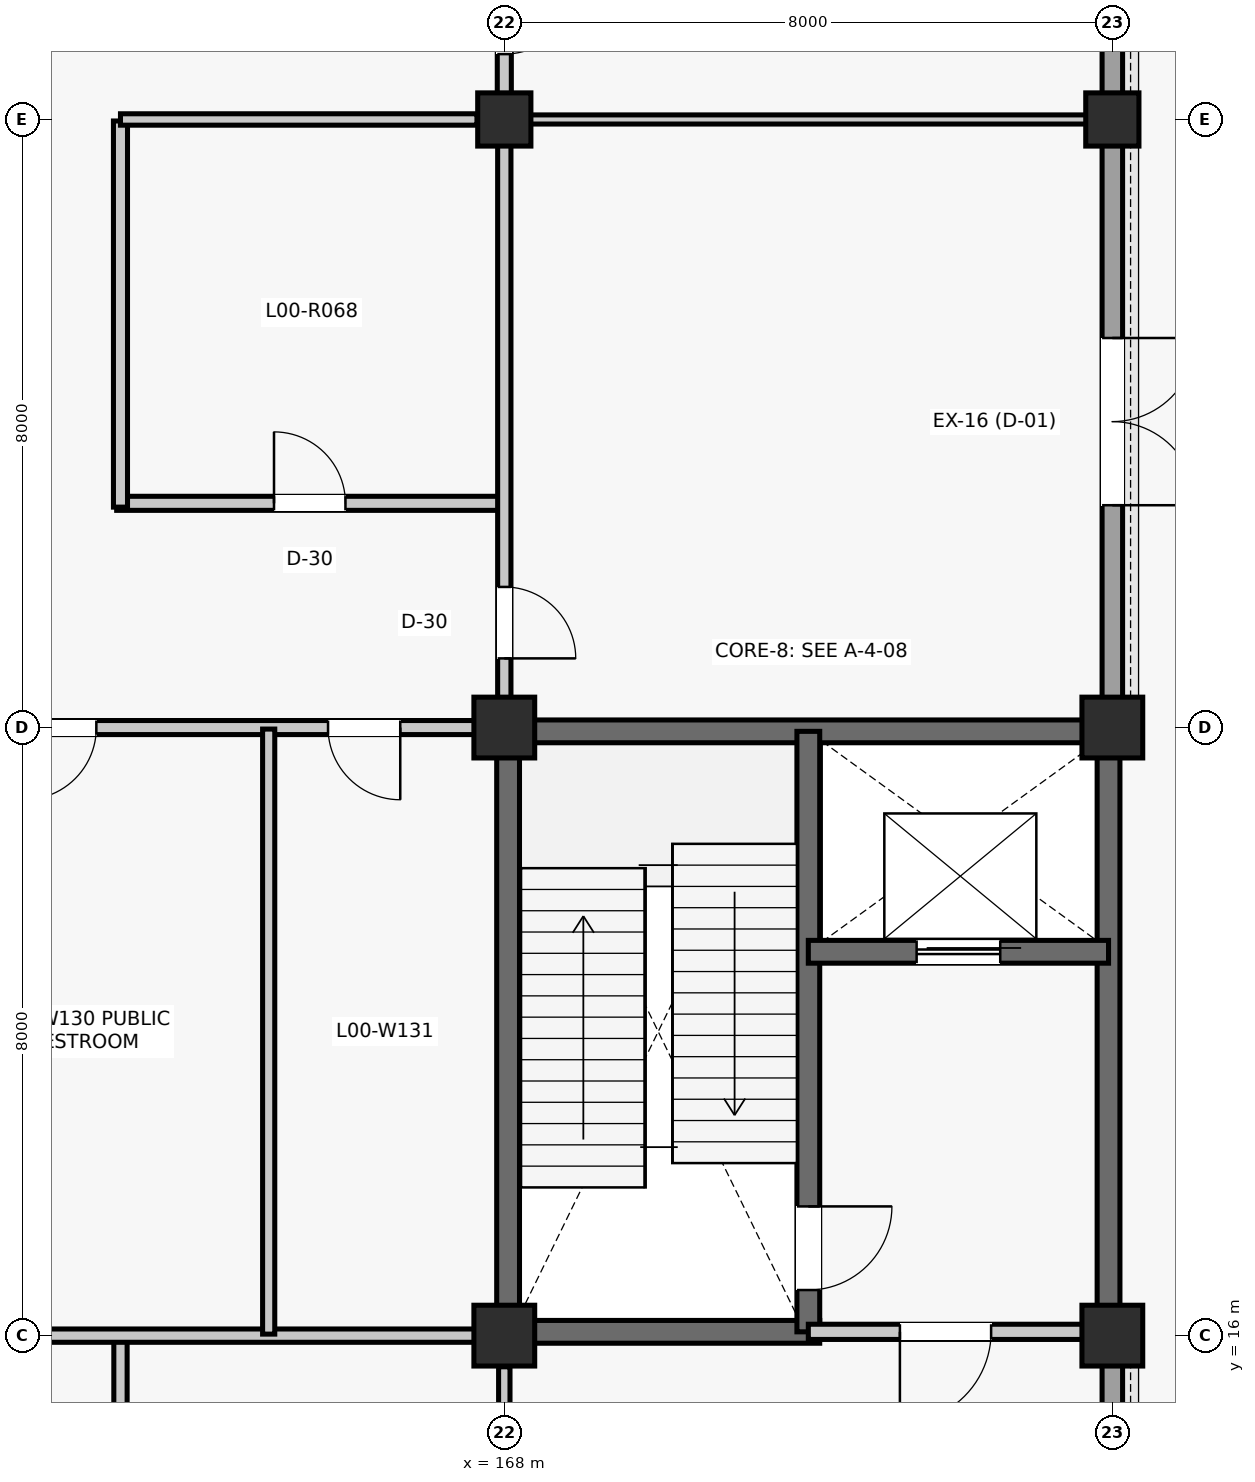
"""IFC4 building model, lengths in metres.
Left out: names, types, materials, properties, quantities, classifications, styles, units other than length and angle.
Written with IfcOpenShell. Run it as: python <this file> out.ifc"""

import sys

from ifc_helpers import new_model, si_unit, direction, frame, frame_2d, origin, origin_2d, place, context, subcontext, project, spatial, rectangle, extrude, element, fill, save


model = new_model("IFC4")
c1 = context("Model", 3, precision=1e-05, world=origin(), true_north=direction((0.0, 1.0)))
c2 = subcontext(c1, "Body", "Model", "MODEL_VIEW")
j1 = project(units=[si_unit("LENGTHUNIT", "METRE"), si_unit("PLANEANGLEUNIT", "RADIAN")], contexts=[c1])
p1 = place(None, origin())
s1 = spatial("IfcSite", under=j1, at=p1, CompositionType="ELEMENT")
p2 = place(p1, origin())
s2 = spatial("IfcBuilding", under=s1, at=p2, CompositionType="ELEMENT")
p3 = place(p2, origin())
s3 = spatial("IfcBuildingStorey", under=s2, at=p3, CompositionType="ELEMENT", Elevation=0.0)
for number, where, z_axis, x_axis in (
    (1, (168.0, 16.0, 0.0), (0.0, 0.0, 1.0), (1.0, 0.0, 0.0)),
    (2, (168.0, 24.0, 0.0), (0.0, 0.0, 1.0), (1.0, 0.0, 0.0)),
):
    element("IfcColumn", number, at=place(p3, frame(where, z_axis=z_axis, x_axis=x_axis)), inside=s3, PredefinedType="COLUMN", context=c2, shape_type="SweptSolid", body=[
        extrude(rectangle(XDim=0.8, YDim=0.8, at=origin_2d()), origin(), (0.0, 0.0, 1.0), 5.28),
    ])
p4 = place(p3, frame((168.0, 32.0, 0.0), z_axis=(0.0, 0.0, 1.0), x_axis=(1.0, 0.0, 0.0)))
e3 = element("IfcColumn", 3, at=p4, inside=s3, PredefinedType="COLUMN", context=c2, shape_type="SweptSolid", body=[
    extrude(rectangle(XDim=0.7, YDim=0.7, at=origin_2d()), origin(), (0.0, 0.0, 1.0), 5.28),
])
for number, where, z_axis, x_axis in (
    (4, (176.0, 16.0, 0.0), (0.0, 0.0, 1.0), (1.0, 0.0, 0.0)),
    (5, (176.0, 24.0, 0.0), (0.0, 0.0, 1.0), (1.0, 0.0, 0.0)),
):
    element("IfcColumn", number, at=place(p3, frame(where, z_axis=z_axis, x_axis=x_axis)), inside=s3, PredefinedType="COLUMN", context=c2, shape_type="SweptSolid", body=[
        extrude(rectangle(XDim=0.8, YDim=0.8, at=origin_2d()), origin(), (0.0, 0.0, 1.0), 5.28),
    ])
p5 = place(p3, frame((176.0, 32.0, 0.0), z_axis=(0.0, 0.0, 1.0), x_axis=(1.0, 0.0, 0.0)))
e6 = element("IfcColumn", 6, at=p5, inside=s3, PredefinedType="COLUMN", context=c2, shape_type="SweptSolid", body=[
    extrude(rectangle(XDim=0.7, YDim=0.7, at=origin_2d()), origin(), (0.0, 0.0, 1.0), 5.28),
])
p6 = place(p3, frame((176.0, 8.335, 0.0), z_axis=(0.0, 0.0, 1.0), x_axis=(0.0, 1.0, 0.0)))
e7 = element("IfcWall", 7, at=p6, inside=s3, PredefinedType="SOLIDWALL", context=c2, shape_type="SweptSolid", body=[
    extrude(rectangle(XDim=7.28, YDim=0.27, at=frame_2d((3.64, 0.0))), origin(), (0.0, 0.0, 1.0), 4.677),
])
p7 = place(p6, frame((4.25, 0.0, 0.9)))
e8 = element("IfcOpeningElement", 8, at=p7, cuts=e7, PredefinedType="OPENING", context=c2, shape_type="SweptSolid", body=[
    extrude(rectangle(XDim=1.85, YDim=2.65, at=frame_2d((0.925, 1.325))), frame((0.0, 0.145, 0.0), z_axis=(0.0, -1.0, 0.0), x_axis=(1.0, 0.0, 0.0)), (0.0, 0.0, 1.0), 0.29),
])
p8 = place(p3, frame((176.0, 24.385, 0.0), z_axis=(0.0, 0.0, 1.0), x_axis=(0.0, 1.0, 0.0)))
e9 = element("IfcWall", 9, at=p8, inside=s3, PredefinedType="SOLIDWALL", context=c2, shape_type="SweptSolid", body=[
    extrude(rectangle(XDim=7.28, YDim=0.27, at=frame_2d((3.64, 0.0))), origin(), (0.0, 0.0, 1.0), 4.674),
])
p9 = place(p8, frame((2.54, 0.0, 0.0)))
e10 = element("IfcOpeningElement", 10, at=p9, cuts=e9, PredefinedType="OPENING", context=c2, shape_type="SweptSolid", body=[
    extrude(rectangle(XDim=2.2, YDim=2.5, at=frame_2d((1.1, 1.25))), frame((0.0, 0.145, 0.0), z_axis=(0.0, -1.0, 0.0), x_axis=(1.0, 0.0, 0.0)), (0.0, 0.0, 1.0), 0.29),
])
p10 = place(p3, frame((176.0, 32.335, 0.0), z_axis=(0.0, 0.0, 1.0), x_axis=(0.0, 1.0, 0.0)))
e11 = element("IfcWall", 11, at=p10, inside=s3, PredefinedType="SOLIDWALL", context=c2, shape_type="SweptSolid", body=[
    extrude(rectangle(XDim=7.33, YDim=0.27, at=frame_2d((3.665, 0.0))), origin(), (0.0, 0.0, 1.0), 4.614),
])
p11 = place(p10, frame((4.25, 0.0, 0.9)))
e12 = element("IfcOpeningElement", 12, at=p11, cuts=e11, PredefinedType="OPENING", context=c2, shape_type="SweptSolid", body=[
    extrude(rectangle(XDim=2.15, YDim=2.8, at=frame_2d((1.075, 1.4))), frame((0.0, 0.145, 0.0), z_axis=(0.0, -1.0, 0.0), x_axis=(1.0, 0.0, 0.0)), (0.0, 0.0, 1.0), 0.29),
])
for number, where, z_axis, x_axis in (
    (13, (168.05, 16.29, 0.0), (0.0, 0.0, 1.0), (0.0, 1.0, 0.0)),
    (14, (168.29, 23.95, 0.0), (0.0, 0.0, 1.0), (1.0, 0.0, 0.0)),
    (15, (175.95, 16.29, 0.0), (0.0, 0.0, 1.0), (0.0, 1.0, 0.0)),
):
    element("IfcWall", number, at=place(p3, frame(where, z_axis=z_axis, x_axis=x_axis)), inside=s3, PredefinedType="SHEAR", context=c2, shape_type="SweptSolid", body=[
        extrude(rectangle(XDim=7.42, YDim=0.3, at=frame_2d((3.71, 0.0))), origin(), (0.0, 0.0, 1.0), 5.035),
    ])
p12 = place(p3, frame((168.29, 16.05, 0.0), z_axis=(0.0, 0.0, 1.0), x_axis=(1.0, 0.0, 0.0)))
e16 = element("IfcWall", 16, at=p12, inside=s3, PredefinedType="SHEAR", context=c2, shape_type="SweptSolid", body=[
    extrude(rectangle(XDim=3.86, YDim=0.3, at=frame_2d((1.93, 0.0))), origin(), (0.0, 0.0, 1.0), 5.035),
])
p13 = place(p3, frame((172.0, 16.05, 0.0), z_axis=(0.0, 0.0, 1.0), x_axis=(0.0, 1.0, 0.0)))
e17 = element("IfcWall", 17, at=p13, inside=s3, PredefinedType="SHEAR", context=c2, shape_type="SweptSolid", body=[
    extrude(rectangle(XDim=7.9, YDim=0.3, at=frame_2d((3.95, 0.0))), origin(), (0.0, 0.0, 1.0), 5.035),
])
p14 = place(p13, frame((0.55, 0.0, 0.0)))
e18 = element("IfcOpeningElement", 18, at=p14, cuts=e17, PredefinedType="OPENING", context=c2, shape_type="SweptSolid", body=[
    extrude(rectangle(XDim=1.1, YDim=2.15, at=frame_2d((0.55, 1.075))), frame((0.0, 0.16, 0.0), z_axis=(0.0, -1.0, 0.0), x_axis=(1.0, 0.0, 0.0)), (0.0, 0.0, 1.0), 0.32),
])
p15 = place(p3, frame((172.0, 21.05, 0.0), z_axis=(0.0, 0.0, 1.0), x_axis=(1.0, 0.0, 0.0)))
e19 = element("IfcWall", 19, at=p15, inside=s3, PredefinedType="SHEAR", context=c2, shape_type="SweptSolid", body=[
    extrude(rectangle(XDim=3.95, YDim=0.3, at=frame_2d((1.975, 0.0))), origin(), (0.0, 0.0, 1.0), 5.035),
])
p16 = place(p15, frame((1.425, 0.0, 0.0)))
e20 = element("IfcOpeningElement", 20, at=p16, cuts=e19, PredefinedType="OPENING", context=c2, shape_type="SweptSolid", body=[
    extrude(rectangle(XDim=1.1, YDim=2.2, at=frame_2d((0.55, 1.1))), frame((0.0, 0.16, 0.0), z_axis=(0.0, -1.0, 0.0), x_axis=(1.0, 0.0, 0.0)), (0.0, 0.0, 1.0), 0.32),
])
p17 = place(p3, frame((172.0, 16.05, 0.0), z_axis=(0.0, 0.0, 1.0), x_axis=(1.0, 0.0, 0.0)))
e21 = element("IfcWall", 21, at=p17, inside=s3, PredefinedType="PARTITIONING", context=c2, shape_type="SweptSolid", body=[
    extrude(rectangle(XDim=3.61, YDim=0.2, at=frame_2d((1.805, 0.0))), origin(), (0.0, 0.0, 1.0), 4.404),
])
p18 = place(p17, frame((1.205, 0.0, 0.0)))
e22 = element("IfcOpeningElement", 22, at=p18, cuts=e21, PredefinedType="OPENING", context=c2, shape_type="SweptSolid", body=[
    extrude(rectangle(XDim=1.2, YDim=2.15, at=frame_2d((0.6, 1.075))), frame((0.0, 0.11, 0.0), z_axis=(0.0, -1.0, 0.0), x_axis=(1.0, 0.0, 0.0)), (0.0, 0.0, 1.0), 0.22),
])
p19 = place(p3, frame((162.95, 10.9, 0.0), z_axis=(0.0, 0.0, 1.0), x_axis=(0.0, 1.0, 0.0)))
e23 = element("IfcWall", 23, at=p19, inside=s3, PredefinedType="PARTITIONING", context=c2, shape_type="SweptSolid", body=[
    extrude(rectangle(XDim=5.08, YDim=0.175, at=frame_2d((2.54, 0.0))), origin(), (0.0, 0.0, 1.0), 4.336),
])
p20 = place(p3, frame((168.0, 10.95, 0.0), z_axis=(0.0, 0.0, 1.0), x_axis=(0.0, 1.0, 0.0)))
e24 = element("IfcWall", 24, at=p20, inside=s3, PredefinedType="PARTITIONING", context=c2, shape_type="SweptSolid", body=[
    extrude(rectangle(XDim=4.64, YDim=0.15, at=frame_2d((2.32, 0.0))), origin(), (0.0, 0.0, 1.0), 4.404),
])
p21 = place(p3, frame((162.9, 26.95, 0.0), z_axis=(0.0, 0.0, 1.0), x_axis=(1.0, 0.0, 0.0)))
e25 = element("IfcWall", 25, at=p21, inside=s3, PredefinedType="PARTITIONING", context=c2, shape_type="SweptSolid", body=[
    extrude(rectangle(XDim=5.08, YDim=0.185, at=frame_2d((2.54, 0.0))), origin(), (0.0, 0.0, 1.0), 4.403),
])
p22 = place(p21, frame((2.07, 0.0, 0.0)))
e26 = element("IfcOpeningElement", 26, at=p22, cuts=e25, PredefinedType="OPENING", context=c2, shape_type="SweptSolid", body=[
    extrude(rectangle(XDim=0.94, YDim=2.12, at=frame_2d((0.47, 1.06))), frame((0.0, 0.103, 0.0), z_axis=(0.0, -1.0, 0.0), x_axis=(1.0, 0.0, 0.0)), (0.0, 0.0, 1.0), 0.205),
])
p23 = place(p3, frame((162.95, 26.9, 0.0), z_axis=(0.0, 0.0, 1.0), x_axis=(0.0, 1.0, 0.0)))
e27 = element("IfcWall", 27, at=p23, inside=s3, PredefinedType="PARTITIONING", context=c2, shape_type="SweptSolid", body=[
    extrude(rectangle(XDim=5.08, YDim=0.185, at=frame_2d((2.54, 0.0))), origin(), (0.0, 0.0, 1.0), 4.327),
])
p24 = place(p3, frame((162.95, 32.0, 0.0), z_axis=(0.0, 0.0, 1.0), x_axis=(1.0, 0.0, 0.0)))
e28 = element("IfcWall", 28, at=p24, inside=s3, PredefinedType="PARTITIONING", context=c2, shape_type="SweptSolid", body=[
    extrude(rectangle(XDim=4.69, YDim=0.15, at=frame_2d((2.345, 0.0))), origin(), (0.0, 0.0, 1.0), 4.327),
])
p25 = place(p3, frame((160.34, 16.0, 0.0), z_axis=(0.0, 0.0, 1.0), x_axis=(1.0, 0.0, 0.0)))
e29 = element("IfcWall", 29, at=p25, inside=s3, PredefinedType="PARTITIONING", context=c2, shape_type="SweptSolid", body=[
    extrude(rectangle(XDim=7.27, YDim=0.175, at=frame_2d((3.635, 0.0))), origin(), (0.0, 0.0, 1.0), 4.336),
])
p26 = place(p25, frame((0.52, 0.0, 0.0)))
e30 = element("IfcOpeningElement", 30, at=p26, cuts=e29, PredefinedType="OPENING", context=c2, shape_type="SweptSolid", body=[
    extrude(rectangle(XDim=0.94, YDim=2.12, at=frame_2d((0.47, 1.06))), frame((0.0, 0.097, 0.0), z_axis=(0.0, -1.0, 0.0), x_axis=(1.0, 0.0, 0.0)), (0.0, 0.0, 1.0), 0.195),
])
p27 = place(p3, frame((160.34, 24.0, 0.0), z_axis=(0.0, 0.0, 1.0), x_axis=(1.0, 0.0, 0.0)))
e31 = element("IfcWall", 31, at=p27, inside=s3, PredefinedType="PARTITIONING", context=c2, shape_type="SweptSolid", body=[
    extrude(rectangle(XDim=7.27, YDim=0.185, at=frame_2d((3.635, 0.0))), origin(), (0.0, 0.0, 1.0), 4.404),
])
p28 = place(p27, frame((1.343, 0.0, 0.0)))
e32 = element("IfcOpeningElement", 32, at=p28, cuts=e31, PredefinedType="OPENING", context=c2, shape_type="SweptSolid", body=[
    extrude(rectangle(XDim=0.95, YDim=2.1, at=frame_2d((0.475, 1.05))), frame((0.0, 0.103, 0.0), z_axis=(0.0, -1.0, 0.0), x_axis=(1.0, 0.0, 0.0)), (0.0, 0.0, 1.0), 0.205),
])
p29 = place(p27, frame((5.341, 0.0, 0.0)))
e33 = element("IfcOpeningElement", 33, at=p29, cuts=e31, PredefinedType="OPENING", context=c2, shape_type="SweptSolid", body=[
    extrude(rectangle(XDim=0.95, YDim=2.1, at=frame_2d((0.475, 1.05))), frame((0.0, 0.103, 0.0), z_axis=(0.0, -1.0, 0.0), x_axis=(1.0, 0.0, 0.0)), (0.0, 0.0, 1.0), 0.205),
])
p30 = place(p3, frame((168.0, 24.39, 0.0), z_axis=(0.0, 0.0, 1.0), x_axis=(0.0, 1.0, 0.0)))
e34 = element("IfcWall", 34, at=p30, inside=s3, PredefinedType="PARTITIONING", context=c2, shape_type="SweptSolid", body=[
    extrude(rectangle(XDim=7.27, YDim=0.175, at=frame_2d((3.635, 0.0))), origin(), (0.0, 0.0, 1.0), 4.403),
])
p31 = place(p30, frame((0.52, 0.0, 0.0)))
e35 = element("IfcOpeningElement", 35, at=p31, cuts=e34, PredefinedType="OPENING", context=c2, shape_type="SweptSolid", body=[
    extrude(rectangle(XDim=0.94, YDim=2.12, at=frame_2d((0.47, 1.06))), frame((0.0, 0.097, 0.0), z_axis=(0.0, -1.0, 0.0), x_axis=(1.0, 0.0, 0.0)), (0.0, 0.0, 1.0), 0.195),
])
p32 = place(p3, frame((168.0, 32.34, 0.0), z_axis=(0.0, 0.0, 1.0), x_axis=(0.0, 1.0, 0.0)))
e36 = element("IfcWall", 36, at=p32, inside=s3, PredefinedType="PARTITIONING", context=c2, shape_type="SweptSolid", body=[
    extrude(rectangle(XDim=7.32, YDim=0.185, at=frame_2d((3.66, 0.0))), origin(), (0.0, 0.0, 1.0), 4.412),
])
p33 = place(p32, frame((0.52, 0.0, 0.0)))
e37 = element("IfcOpeningElement", 37, at=p33, cuts=e36, PredefinedType="OPENING", context=c2, shape_type="SweptSolid", body=[
    extrude(rectangle(XDim=0.94, YDim=2.12, at=frame_2d((0.47, 1.06))), frame((0.0, 0.103, 0.0), z_axis=(0.0, -1.0, 0.0), x_axis=(1.0, 0.0, 0.0)), (0.0, 0.0, 1.0), 0.205),
])
p34 = place(p3, frame((168.34, 32.0, 0.0), z_axis=(0.0, 0.0, 1.0), x_axis=(1.0, 0.0, 0.0)))
e38 = element("IfcWall", 38, at=p34, inside=s3, PredefinedType="PARTITIONING", context=c2, shape_type="SweptSolid", body=[
    extrude(rectangle(XDim=7.32, YDim=0.12, at=frame_2d((3.66, 0.0))), origin(), (0.0, 0.0, 1.0), 4.403),
])
p35 = place(p3, frame((164.9, 16.02, 0.0), z_axis=(0.0, 0.0, 1.0), x_axis=(0.0, 1.0, 0.0)))
e39 = element("IfcWall", 39, at=p35, inside=s3, PredefinedType="PARTITIONING", context=c2, shape_type="SweptSolid", body=[
    extrude(rectangle(XDim=7.96, YDim=0.16, at=frame_2d((3.98, 0.0))), origin(), (0.0, 0.0, 1.0), 4.336),
])
p36 = place(p9, frame((2.2, 0.0, 0.0), z_axis=(0.0, 0.0, 1.0), x_axis=(-1.0, 0.0, 0.0)))
e40 = element("IfcDoor", 40, at=p36, inside=s3, OperationType="DOUBLE_DOOR_SINGLE_SWING", PredefinedType="DOOR", context=c2, shape_type="SweptSolid", body=[
    extrude(rectangle(XDim=2.2, YDim=2.5, at=frame_2d((1.1, 1.25))), frame((0.0, 0.025, 0.0), z_axis=(0.0, -1.0, 0.0), x_axis=(1.0, 0.0, 0.0)), (0.0, 0.0, 1.0), 0.05),
])
fill(e10, e40)
p37 = place(p14, frame((1.1, 0.0, 0.0), z_axis=(0.0, 0.0, 1.0), x_axis=(-1.0, 0.0, 0.0)))
e41 = element("IfcDoor", 41, at=p37, inside=s3, OperationType="SINGLE_SWING_RIGHT", PredefinedType="DOOR", context=c2, shape_type="SweptSolid", body=[
    extrude(rectangle(XDim=1.1, YDim=2.15, at=frame_2d((0.55, 1.075))), frame((0.0, 0.025, 0.0), z_axis=(0.0, -1.0, 0.0), x_axis=(1.0, 0.0, 0.0)), (0.0, 0.0, 1.0), 0.05),
])
fill(e18, e41)
p38 = place(p16, origin())
e42 = element("IfcDoor", 42, at=p38, inside=s3, OperationType="SLIDING_TO_LEFT", PredefinedType="DOOR", context=c2, shape_type="SweptSolid", body=[
    extrude(rectangle(XDim=1.1, YDim=2.2, at=frame_2d((0.55, 1.1))), frame((0.0, 0.025, 0.0), z_axis=(0.0, -1.0, 0.0), x_axis=(1.0, 0.0, 0.0)), (0.0, 0.0, 1.0), 0.05),
])
fill(e20, e42)
p39 = place(p18, frame((1.2, 0.0, 0.0), z_axis=(0.0, 0.0, 1.0), x_axis=(-1.0, 0.0, 0.0)))
e43 = element("IfcDoor", 43, at=p39, inside=s3, OperationType="SINGLE_SWING_LEFT", PredefinedType="DOOR", context=c2, shape_type="SweptSolid", body=[
    extrude(rectangle(XDim=1.2, YDim=2.15, at=frame_2d((0.6, 1.075))), frame((0.0, 0.025, 0.0), z_axis=(0.0, -1.0, 0.0), x_axis=(1.0, 0.0, 0.0)), (0.0, 0.0, 1.0), 0.05),
])
fill(e22, e43)
p40 = place(p22, origin())
e44 = element("IfcDoor", 44, at=p40, inside=s3, OperationType="SINGLE_SWING_LEFT", PredefinedType="DOOR", context=c2, shape_type="SweptSolid", body=[
    extrude(rectangle(XDim=0.94, YDim=2.12, at=frame_2d((0.47, 1.06))), frame((0.0, 0.025, 0.0), z_axis=(0.0, -1.0, 0.0), x_axis=(1.0, 0.0, 0.0)), (0.0, 0.0, 1.0), 0.05),
])
fill(e26, e44)
p41 = place(p28, frame((0.95, 0.0, 0.0), z_axis=(0.0, 0.0, 1.0), x_axis=(-1.0, 0.0, 0.0)))
e45 = element("IfcDoor", 45, at=p41, inside=s3, OperationType="SINGLE_SWING_LEFT", PredefinedType="DOOR", context=c2, shape_type="SweptSolid", body=[
    extrude(rectangle(XDim=0.95, YDim=2.1, at=frame_2d((0.475, 1.05))), frame((0.0, 0.025, 0.0), z_axis=(0.0, -1.0, 0.0), x_axis=(1.0, 0.0, 0.0)), (0.0, 0.0, 1.0), 0.05),
])
fill(e32, e45)
p42 = place(p29, frame((0.95, 0.0, 0.0), z_axis=(0.0, 0.0, 1.0), x_axis=(-1.0, 0.0, 0.0)))
e46 = element("IfcDoor", 46, at=p42, inside=s3, OperationType="SINGLE_SWING_RIGHT", PredefinedType="DOOR", context=c2, shape_type="SweptSolid", body=[
    extrude(rectangle(XDim=0.95, YDim=2.1, at=frame_2d((0.475, 1.05))), frame((0.0, 0.025, 0.0), z_axis=(0.0, -1.0, 0.0), x_axis=(1.0, 0.0, 0.0)), (0.0, 0.0, 1.0), 0.05),
])
fill(e33, e46)
p43 = place(p31, frame((0.94, 0.0, 0.0), z_axis=(0.0, 0.0, 1.0), x_axis=(-1.0, 0.0, 0.0)))
e47 = element("IfcDoor", 47, at=p43, inside=s3, OperationType="SINGLE_SWING_LEFT", PredefinedType="DOOR", context=c2, shape_type="SweptSolid", body=[
    extrude(rectangle(XDim=0.94, YDim=2.12, at=frame_2d((0.47, 1.06))), frame((0.0, 0.025, 0.0), z_axis=(0.0, -1.0, 0.0), x_axis=(1.0, 0.0, 0.0)), (0.0, 0.0, 1.0), 0.05),
])
fill(e35, e47)
p44 = place(p33, frame((0.94, 0.0, 0.0), z_axis=(0.0, 0.0, 1.0), x_axis=(-1.0, 0.0, 0.0)))
e48 = element("IfcDoor", 48, at=p44, inside=s3, OperationType="SINGLE_SWING_RIGHT", PredefinedType="DOOR", context=c2, shape_type="SweptSolid", body=[
    extrude(rectangle(XDim=0.94, YDim=2.12, at=frame_2d((0.47, 1.06))), frame((0.0, 0.025, 0.0), z_axis=(0.0, -1.0, 0.0), x_axis=(1.0, 0.0, 0.0)), (0.0, 0.0, 1.0), 0.05),
])
fill(e37, e48)
save(model, sys.argv[1])
